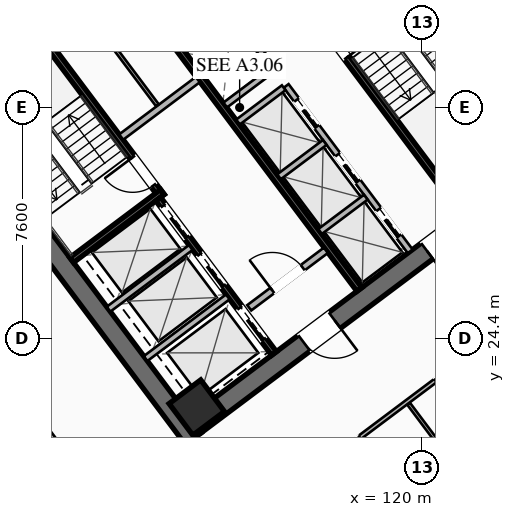
"""IFC4 building model, lengths in metres.
Left out: names, types, materials, properties, quantities, classifications, styles, units other than length and angle.
Written with IfcOpenShell. Run it as: python <this file> out.ifc"""

import sys

from ifc_helpers import new_model, si_unit, direction, frame, frame_2d, origin, origin_2d, place, context, subcontext, project, spatial, rectangle, hollow_rectangle, extrude, element, fill, save


model = new_model("IFC4")
c1 = context("Model", 3, precision=1e-05, world=origin(), true_north=direction((0.0, 1.0)))
c2 = subcontext(c1, "Body", "Model", "MODEL_VIEW")
j1 = project(units=[si_unit("LENGTHUNIT", "METRE"), si_unit("PLANEANGLEUNIT", "RADIAN")], contexts=[c1])
p1 = place(None, origin())
s1 = spatial("IfcSite", under=j1, at=p1, CompositionType="ELEMENT")
p2 = place(p1, origin())
s2 = spatial("IfcBuilding", under=s1, at=p2, CompositionType="ELEMENT")
p3 = place(p2, frame((0.0, 0.0, 38.8)))
s3 = spatial("IfcBuildingStorey", under=s2, at=p3, CompositionType="ELEMENT", Elevation=38.8)
for number, where, z_axis, x_axis in (
    (1, (112.476, 21.107, 0.0), (0.0, 0.0, 1.0), (-0.6, 0.8, 0.0)),
    (2, (115.524, 42.893, 0.0), (0.0, 0.0, 1.0), (0.6, -0.8, 0.0)),
):
    element("IfcWall", number, at=place(p3, frame(where, z_axis=z_axis, x_axis=x_axis)), inside=s3, PredefinedType="SHEAR", context=c2, shape_type="SweptSolid", body=[
        extrude(rectangle(XDim=15.6, YDim=0.65, at=frame_2d((7.8, 0.0))), origin(), (0.0, 0.0, 1.0), 3.55),
    ])
p4 = place(p3, frame((124.429, 30.478, 0.0), z_axis=(0.0, 0.0, 1.0), x_axis=(-0.799998028465, -0.600002628705, 0.0)))
e3 = element("IfcWall", 3, at=p4, inside=s3, PredefinedType="SHEAR", context=c2, shape_type="SweptSolid", body=[
    extrude(rectangle(XDim=14.86, YDim=0.65, at=frame_2d((7.43, 0.0))), origin(), (0.0, 0.0, 1.0), 3.55),
])
p5 = place(p4, frame((9.13, 0.0, 0.0)))
e4 = element("IfcOpeningElement", 4, at=p5, cuts=e3, PredefinedType="OPENING", context=c2, shape_type="SweptSolid", body=[
    extrude(rectangle(XDim=1.25, YDim=2.25, at=frame_2d((0.625, 1.125))), frame((0.0, 0.335, 0.0), z_axis=(0.0, -1.0, 0.0), x_axis=(1.0, 0.0, 0.0)), (0.0, 0.0, 1.0), 0.67),
])
p6 = place(p4, frame((4.08, 0.0, 0.0)))
e5 = element("IfcOpeningElement", 5, at=p6, cuts=e3, PredefinedType="OPENING", context=c2, shape_type="SweptSolid", body=[
    extrude(rectangle(XDim=1.25, YDim=2.25, at=frame_2d((0.625, 1.125))), frame((0.0, 0.335, 0.0), z_axis=(0.0, -1.0, 0.0), x_axis=(1.0, 0.0, 0.0)), (0.0, 0.0, 1.0), 0.67),
])
p7 = place(p3, frame((103.571, 33.522, 0.0), z_axis=(0.0, 0.0, 1.0), x_axis=(0.799998028465, 0.600002628705, 0.0)))
e6 = element("IfcWall", 6, at=p7, inside=s3, PredefinedType="SHEAR", context=c2, shape_type="SweptSolid", body=[
    extrude(rectangle(XDim=14.86, YDim=0.65, at=frame_2d((7.43, 0.0))), origin(), (0.0, 0.0, 1.0), 3.55),
])
p8 = place(p7, frame((4.48, 0.0, 0.0)))
e7 = element("IfcOpeningElement", 7, at=p8, cuts=e6, PredefinedType="OPENING", context=c2, shape_type="SweptSolid", body=[
    extrude(rectangle(XDim=1.25, YDim=2.25, at=frame_2d((0.625, 1.125))), frame((0.0, 0.335, 0.0), z_axis=(0.0, -1.0, 0.0), x_axis=(1.0, 0.0, 0.0)), (0.0, 0.0, 1.0), 0.67),
])
p9 = place(p7, frame((9.53, 0.0, 0.0)))
e8 = element("IfcOpeningElement", 8, at=p9, cuts=e6, PredefinedType="OPENING", context=c2, shape_type="SweptSolid", body=[
    extrude(rectangle(XDim=1.25, YDim=2.25, at=frame_2d((0.625, 1.125))), frame((0.0, 0.335, 0.0), z_axis=(0.0, -1.0, 0.0), x_axis=(1.0, 0.0, 0.0)), (0.0, 0.0, 1.0), 0.67),
])
p10 = place(p3, frame((112.59, 22.13, 0.0), z_axis=(0.0, 0.0, 1.0), x_axis=(0.799999996291, 0.600000004945, 0.0)))
e9 = element("IfcColumn", 9, at=p10, inside=s3, PredefinedType="COLUMN", context=c2, shape_type="SweptSolid", body=[
    extrude(hollow_rectangle(XDim=1.3, YDim=1.3, WallThickness=0.05, at=origin_2d()), origin(), (0.0, 0.0, 1.0), 3.35),
])
p11 = place(p3, frame((111.44, 29.08, 0.0), z_axis=(0.0, 0.0, 1.0), x_axis=(-0.600009827119, 0.799992629566, 0.0)))
e10 = element("IfcWall", 10, at=p11, inside=s3, PredefinedType="SHEAR", context=c2, shape_type="SweptSolid", body=[
    extrude(rectangle(XDim=7.95, YDim=0.2, at=frame_2d((3.975, 0.0))), origin(), (0.0, 0.0, 1.0), 3.35),
])
p12 = place(p11, frame((0.45, 0.0, 0.0)))
e11 = element("IfcOpeningElement", 11, at=p12, cuts=e10, PredefinedType="OPENING", context=c2, shape_type="SweptSolid", body=[
    extrude(rectangle(XDim=1.15, YDim=2.2, at=frame_2d((0.575, 1.1))), frame((0.0, 0.11, 0.0), z_axis=(0.0, -1.0, 0.0), x_axis=(1.0, 0.0, 0.0)), (0.0, 0.0, 1.0), 0.22),
])
p13 = place(p3, frame((108.476, 26.982, 0.0), z_axis=(0.0, 0.0, 1.0), x_axis=(0.799984290658, 0.600020945218, 0.0)))
e12 = element("IfcWall", 12, at=p13, inside=s3, PredefinedType="SHEAR", context=c2, shape_type="SweptSolid", body=[
    extrude(rectangle(XDim=3.73, YDim=0.2, at=frame_2d((1.865, 0.0))), origin(), (0.0, 0.0, 1.0), 3.35),
])
p14 = place(p3, frame((116.56, 34.92, 0.0), z_axis=(0.0, 0.0, 1.0), x_axis=(0.600009827119, -0.799992629566, 0.0)))
e13 = element("IfcWall", 13, at=p14, inside=s3, PredefinedType="SHEAR", context=c2, shape_type="SweptSolid", body=[
    extrude(rectangle(XDim=7.95, YDim=0.2, at=frame_2d((3.975, 0.0))), origin(), (0.0, 0.0, 1.0), 3.35),
])
p15 = place(p14, frame((0.45, 0.0, 0.0)))
e14 = element("IfcOpeningElement", 14, at=p15, cuts=e13, PredefinedType="OPENING", context=c2, shape_type="SweptSolid", body=[
    extrude(rectangle(XDim=1.15, YDim=2.2, at=frame_2d((0.575, 1.1))), frame((0.0, 0.11, 0.0), z_axis=(0.0, -1.0, 0.0), x_axis=(1.0, 0.0, 0.0)), (0.0, 0.0, 1.0), 0.22),
])
p16 = place(p3, frame((117.938, 26.016, 0.0), z_axis=(0.0, 0.0, 1.0), x_axis=(-0.600005463273, 0.799995902516, 0.0)))
e15 = element("IfcWall", 15, at=p16, inside=s3, PredefinedType="SHEAR", context=c2, shape_type="SweptSolid", body=[
    extrude(rectangle(XDim=14.3, YDim=0.2, at=frame_2d((7.15, 0.0))), origin(), (0.0, 0.0, 1.0), 3.35),
])
p17 = place(p3, frame((110.104, 31.028, 0.0), z_axis=(0.0, 0.0, 1.0), x_axis=(0.800018601094, 0.59997519774, 0.0)))
e16 = element("IfcWall", 16, at=p17, inside=s3, PredefinedType="SOLIDWALL", context=c2, shape_type="SweptSolid", body=[
    extrude(rectangle(XDim=3.15, YDim=0.22, at=frame_2d((1.575, 0.0))), origin(), (0.0, 0.0, 1.0), 2.703),
])
p18 = place(p3, frame((114.316, 25.412, 0.0), z_axis=(0.0, 0.0, 1.0), x_axis=(0.800018601094, 0.59997519774, 0.0)))
e17 = element("IfcWall", 17, at=p18, inside=s3, PredefinedType="SOLIDWALL", context=c2, shape_type="SweptSolid", body=[
    extrude(rectangle(XDim=3.15, YDim=0.22, at=frame_2d((1.575, 0.0))), origin(), (0.0, 0.0, 1.0), 2.703),
])
p19 = place(p18, frame((0.95, 0.0, 0.0)))
e18 = element("IfcOpeningElement", 18, at=p19, cuts=e17, PredefinedType="OPENING", context=c2, shape_type="SweptSolid", body=[
    extrude(rectangle(XDim=1.25, YDim=2.25, at=frame_2d((0.625, 1.125))), frame((0.0, 0.12, 0.0), z_axis=(0.0, -1.0, 0.0), x_axis=(1.0, 0.0, 0.0)), (0.0, 0.0, 1.0), 0.24),
])
p20 = place(p3, frame((115.13, 23.91, 0.0), z_axis=(0.0, 0.0, 1.0), x_axis=(-0.599975393228, 0.800018454488, 0.0)))
e19 = element("IfcWall", 19, at=p20, inside=s3, PredefinedType="SHEAR", context=c2, shape_type="SweptSolid", body=[
    extrude(rectangle(XDim=6.35, YDim=0.2, at=frame_2d((3.175, 0.0))), origin(), (0.0, 0.0, 1.0), 3.35),
])
p21 = place(p20, frame((4.775, 0.0, 0.0)))
e20 = element("IfcOpeningElement", 20, at=p21, cuts=e19, PredefinedType="OPENING", context=c2, shape_type="SweptSolid", body=[
    extrude(rectangle(XDim=1.3, YDim=2.25, at=frame_2d((0.65, 1.125))), frame((0.0, 0.11, 0.0), z_axis=(0.0, -1.0, 0.0), x_axis=(1.0, 0.0, 0.0)), (0.0, 0.0, 1.0), 0.22),
])
p22 = place(p20, frame((2.775, 0.0, 0.0)))
e21 = element("IfcOpeningElement", 21, at=p22, cuts=e19, PredefinedType="OPENING", context=c2, shape_type="SweptSolid", body=[
    extrude(rectangle(XDim=1.3, YDim=2.25, at=frame_2d((0.65, 1.125))), frame((0.0, 0.11, 0.0), z_axis=(0.0, -1.0, 0.0), x_axis=(1.0, 0.0, 0.0)), (0.0, 0.0, 1.0), 0.22),
])
p23 = place(p20, frame((0.575, 0.0, 0.0)))
e22 = element("IfcOpeningElement", 22, at=p23, cuts=e19, PredefinedType="OPENING", context=c2, shape_type="SweptSolid", body=[
    extrude(rectangle(XDim=1.3, YDim=2.25, at=frame_2d((0.65, 1.125))), frame((0.0, 0.11, 0.0), z_axis=(0.0, -1.0, 0.0), x_axis=(1.0, 0.0, 0.0)), (0.0, 0.0, 1.0), 0.22),
])
for number, where, z_axis, x_axis in (
    (23, (110.906, 23.742, 0.0), (0.0, 0.0, 1.0), (0.8, 0.6, 0.0)),
    (24, (109.688, 25.366, 0.0), (0.0, 0.0, 1.0), (0.8, 0.6, 0.0)),
):
    element("IfcWall", number, at=place(p3, frame(where, z_axis=z_axis, x_axis=x_axis)), inside=s3, PredefinedType="SOLIDWALL", context=c2, shape_type="SweptSolid", body=[
        extrude(rectangle(XDim=3.38, YDim=0.2, at=frame_2d((1.69, 0.0))), origin(), (0.0, 0.0, 1.0), 3.35),
    ])
p24 = place(p3, frame((111.296, 32.072, 0.0), z_axis=(0.0, 0.0, 1.0), x_axis=(-0.59995887973, 0.800030838552, 0.0)))
e25 = element("IfcWall", 25, at=p24, inside=s3, PredefinedType="PARTITIONING", context=c2, shape_type="SweptSolid", body=[
    extrude(rectangle(XDim=3.8, YDim=0.11, at=frame_2d((1.9, 0.0))), origin(), (0.0, 0.0, 1.0), 2.703),
])
p25 = place(p3, frame((119.61, 27.27, 0.0), z_axis=(0.0, 0.0, 1.0), x_axis=(-0.600011488909, 0.79999138319, 0.0)))
e26 = element("IfcWall", 26, at=p25, inside=s3, PredefinedType="SOLIDWALL", context=c2, shape_type="SweptSolid", body=[
    extrude(rectangle(XDim=6.8, YDim=0.2, at=frame_2d((3.4, 0.0))), origin(), (0.0, 0.0, 1.0), 3.35),
])
p26 = place(p25, frame((0.625, 0.0, 0.0)))
e27 = element("IfcOpeningElement", 27, at=p26, cuts=e26, PredefinedType="OPENING", context=c2, shape_type="SweptSolid", body=[
    extrude(rectangle(XDim=1.1, YDim=2.2, at=frame_2d((0.55, 1.1))), frame((0.0, 0.11, 0.0), z_axis=(0.0, -1.0, 0.0), x_axis=(1.0, 0.0, 0.0)), (0.0, 0.0, 1.0), 0.22),
])
p27 = place(p25, frame((2.875, 0.0, 0.0)))
e28 = element("IfcOpeningElement", 28, at=p27, cuts=e26, PredefinedType="OPENING", context=c2, shape_type="SweptSolid", body=[
    extrude(rectangle(XDim=1.1, YDim=2.2, at=frame_2d((0.55, 1.1))), frame((0.0, 0.11, 0.0), z_axis=(0.0, -1.0, 0.0), x_axis=(1.0, 0.0, 0.0)), (0.0, 0.0, 1.0), 0.22),
])
p28 = place(p25, frame((5.125, 0.0, 0.0)))
e29 = element("IfcOpeningElement", 29, at=p28, cuts=e26, PredefinedType="OPENING", context=c2, shape_type="SweptSolid", body=[
    extrude(rectangle(XDim=1.1, YDim=2.2, at=frame_2d((0.55, 1.1))), frame((0.0, 0.11, 0.0), z_axis=(0.0, -1.0, 0.0), x_axis=(1.0, 0.0, 0.0)), (0.0, 0.0, 1.0), 0.22),
])
p29 = place(p3, frame((116.646, 27.922, 0.0), z_axis=(0.0, 0.0, 1.0), x_axis=(0.8, 0.6, 0.0)))
e30 = element("IfcWall", 30, at=p29, inside=s3, PredefinedType="SOLIDWALL", context=c2, shape_type="SweptSolid", body=[
    extrude(rectangle(XDim=1.88, YDim=0.2, at=frame_2d((0.94, 0.0))), origin(), (0.0, 0.0, 1.0), 3.35),
])
p30 = place(p3, frame((115.296, 29.722, 0.0), z_axis=(0.0, 0.0, 1.0), x_axis=(0.799984418148, 0.600020775241, 0.0)))
e31 = element("IfcWall", 31, at=p30, inside=s3, PredefinedType="SOLIDWALL", context=c2, shape_type="SweptSolid", body=[
    extrude(rectangle(XDim=1.88, YDim=0.2, at=frame_2d((0.94, 0.0))), origin(), (0.0, 0.0, 1.0), 3.35),
])
p31 = place(p3, frame((113.946, 31.522, 0.0), z_axis=(0.0, 0.0, 1.0), x_axis=(0.8, 0.6, 0.0)))
e32 = element("IfcWall", 32, at=p31, inside=s3, PredefinedType="SOLIDWALL", context=c2, shape_type="SweptSolid", body=[
    extrude(rectangle(XDim=1.88, YDim=0.2, at=frame_2d((0.94, 0.0))), origin(), (0.0, 0.0, 1.0), 3.35),
])
p32 = place(p3, frame((115.11, 33.27, 0.0), z_axis=(0.0, 0.0, 1.0), x_axis=(-0.600011488909, 0.79999138319, 0.0)))
e33 = element("IfcWall", 33, at=p32, inside=s3, PredefinedType="SOLIDWALL", context=c2, shape_type="SweptSolid", body=[
    extrude(rectangle(XDim=6.8, YDim=0.2, at=frame_2d((3.4, 0.0))), origin(), (0.0, 0.0, 1.0), 3.35),
])
p33 = place(p3, frame((113.526, 32.082, 0.0), z_axis=(0.0, 0.0, 1.0), x_axis=(0.800046745961, 0.599937666993, 0.0)))
e34 = element("IfcWall", 34, at=p33, inside=s3, PredefinedType="SOLIDWALL", context=c2, shape_type="SweptSolid", body=[
    extrude(rectangle(XDim=1.88, YDim=0.2, at=frame_2d((0.94, 0.0))), origin(), (0.0, 0.0, 1.0), 3.35),
])
p34 = place(p3, frame((112.176, 33.882, 0.0), z_axis=(0.0, 0.0, 1.0), x_axis=(0.8, 0.6, 0.0)))
e35 = element("IfcWall", 35, at=p34, inside=s3, PredefinedType="SOLIDWALL", context=c2, shape_type="SweptSolid", body=[
    extrude(rectangle(XDim=1.88, YDim=0.2, at=frame_2d((0.94, 0.0))), origin(), (0.0, 0.0, 1.0), 3.35),
])
p35 = place(p3, frame((98.316, 33.862, 0.0), z_axis=(0.0, 0.0, 1.0), x_axis=(0.800001947934, 0.599997402746, 0.0)))
e36 = element("IfcWall", 36, at=p35, inside=s3, PredefinedType="PARTITIONING", context=c2, shape_type="SweptSolid", body=[
    extrude(rectangle(XDim=30.08, YDim=0.135, at=frame_2d((15.04, 0.0))), origin(), (0.0, 0.0, 1.0), 2.703),
])
p36 = place(p35, frame((0.3, 0.0, 0.0)))
e37 = element("IfcOpeningElement", 37, at=p36, cuts=e36, PredefinedType="OPENING", context=c2, shape_type="SweptSolid", body=[
    extrude(rectangle(XDim=0.95, YDim=2.05, at=frame_2d((0.475, 1.025))), frame((0.0, 0.077, 0.0), z_axis=(0.0, -1.0, 0.0), x_axis=(1.0, 0.0, 0.0)), (0.0, 0.0, 1.0), 0.155),
])
p37 = place(p35, frame((7.172, 0.0, 0.0)))
e38 = element("IfcOpeningElement", 38, at=p37, cuts=e36, PredefinedType="OPENING", context=c2, shape_type="SweptSolid", body=[
    extrude(rectangle(XDim=0.95, YDim=2.05, at=frame_2d((0.475, 1.025))), frame((0.0, 0.077, 0.0), z_axis=(0.0, -1.0, 0.0), x_axis=(1.0, 0.0, 0.0)), (0.0, 0.0, 1.0), 0.155),
])
p38 = place(p35, frame((11.218, 0.0, 0.0)))
e39 = element("IfcOpeningElement", 39, at=p38, cuts=e36, PredefinedType="OPENING", context=c2, shape_type="SweptSolid", body=[
    extrude(rectangle(XDim=0.95, YDim=2.05, at=frame_2d((0.475, 1.025))), frame((0.0, 0.077, 0.0), z_axis=(0.0, -1.0, 0.0), x_axis=(1.0, 0.0, 0.0)), (0.0, 0.0, 1.0), 0.155),
])
p39 = place(p35, frame((28.83, 0.0, 0.0)))
e40 = element("IfcOpeningElement", 40, at=p39, cuts=e36, PredefinedType="OPENING", context=c2, shape_type="SweptSolid", body=[
    extrude(rectangle(XDim=0.95, YDim=2.05, at=frame_2d((0.475, 1.025))), frame((0.0, 0.077, 0.0), z_axis=(0.0, -1.0, 0.0), x_axis=(1.0, 0.0, 0.0)), (0.0, 0.0, 1.0), 0.155),
])
p40 = place(p3, frame((135.55, 34.35, 0.0), z_axis=(0.0, 0.0, 1.0), x_axis=(-0.799998052067, -0.600002597235, 0.0)))
e41 = element("IfcWall", 41, at=p40, inside=s3, PredefinedType="PARTITIONING", context=c2, shape_type="SweptSolid", body=[
    extrude(rectangle(XDim=30.08, YDim=0.135, at=frame_2d((15.04, 0.0))), origin(), (0.0, 0.0, 1.0), 2.703),
])
p41 = place(p40, frame((28.75, 0.0, 0.0)))
e42 = element("IfcOpeningElement", 42, at=p41, cuts=e41, PredefinedType="OPENING", context=c2, shape_type="SweptSolid", body=[
    extrude(rectangle(XDim=0.95, YDim=2.05, at=frame_2d((0.475, 1.025))), frame((0.0, 0.077, 0.0), z_axis=(0.0, -1.0, 0.0), x_axis=(1.0, 0.0, 0.0)), (0.0, 0.0, 1.0), 0.155),
])
p42 = place(p40, frame((21.999, 0.0, 0.0)))
e43 = element("IfcOpeningElement", 43, at=p42, cuts=e41, PredefinedType="OPENING", context=c2, shape_type="SweptSolid", body=[
    extrude(rectangle(XDim=0.95, YDim=2.05, at=frame_2d((0.475, 1.025))), frame((0.0, 0.077, 0.0), z_axis=(0.0, -1.0, 0.0), x_axis=(1.0, 0.0, 0.0)), (0.0, 0.0, 1.0), 0.155),
])
p43 = place(p40, frame((17.939, 0.0, 0.0)))
e44 = element("IfcOpeningElement", 44, at=p43, cuts=e41, PredefinedType="OPENING", context=c2, shape_type="SweptSolid", body=[
    extrude(rectangle(XDim=0.95, YDim=2.05, at=frame_2d((0.475, 1.025))), frame((0.0, 0.077, 0.0), z_axis=(0.0, -1.0, 0.0), x_axis=(1.0, 0.0, 0.0)), (0.0, 0.0, 1.0), 0.155),
])
p44 = place(p40, frame((0.38, 0.0, 0.0)))
e45 = element("IfcOpeningElement", 45, at=p44, cuts=e41, PredefinedType="OPENING", context=c2, shape_type="SweptSolid", body=[
    extrude(rectangle(XDim=0.95, YDim=2.05, at=frame_2d((0.475, 1.025))), frame((0.0, 0.077, 0.0), z_axis=(0.0, -1.0, 0.0), x_axis=(1.0, 0.0, 0.0)), (0.0, 0.0, 1.0), 0.155),
])
p45 = place(p3, frame((125.888, 13.816, 0.0), z_axis=(0.0, 0.0, 1.0), x_axis=(-0.599981486892, 0.800013884496, 0.0)))
e46 = element("IfcWall", 46, at=p45, inside=s3, PredefinedType="PARTITIONING", context=c2, shape_type="SweptSolid", body=[
    extrude(rectangle(XDim=10.55, YDim=0.11, at=frame_2d((5.275, 0.0))), origin(), (0.0, 0.0, 1.0), 2.703),
])
p46 = place(p3, frame((111.438, 16.366, 0.0), z_axis=(0.0, 0.0, 1.0), x_axis=(-0.599996414648, 0.800002689001, 0.0)))
e47 = element("IfcWall", 47, at=p46, inside=s3, PredefinedType="PARTITIONING", context=c2, shape_type="SweptSolid", body=[
    extrude(rectangle(XDim=21.79, YDim=0.135, at=frame_2d((10.895, 0.0))), origin(), (0.0, 0.0, 1.0), 2.703),
])
p47 = place(p46, frame((0.3, 0.0, 0.0)))
e48 = element("IfcOpeningElement", 48, at=p47, cuts=e47, PredefinedType="OPENING", context=c2, shape_type="SweptSolid", body=[
    extrude(rectangle(XDim=0.95, YDim=2.05, at=frame_2d((0.475, 1.025))), frame((0.0, 0.077, 0.0), z_axis=(0.0, -1.0, 0.0), x_axis=(1.0, 0.0, 0.0)), (0.0, 0.0, 1.0), 0.155),
])
p48 = place(p5, origin())
e49 = element("IfcDoor", 49, at=p48, inside=s3, OperationType="SINGLE_SWING_LEFT", PredefinedType="DOOR", context=c2, shape_type="SweptSolid", body=[
    extrude(rectangle(XDim=1.25, YDim=2.25, at=frame_2d((0.625, 1.125))), frame((0.0, 0.025, 0.0), z_axis=(0.0, -1.0, 0.0), x_axis=(1.0, 0.0, 0.0)), (0.0, 0.0, 1.0), 0.05),
])
fill(e4, e49)
p49 = place(p6, origin())
e50 = element("IfcDoor", 50, at=p49, inside=s3, OperationType="SINGLE_SWING_RIGHT", PredefinedType="DOOR", context=c2, shape_type="SweptSolid", body=[
    extrude(rectangle(XDim=1.25, YDim=2.25, at=frame_2d((0.625, 1.125))), frame((0.0, 0.025, 0.0), z_axis=(0.0, -1.0, 0.0), x_axis=(1.0, 0.0, 0.0)), (0.0, 0.0, 1.0), 0.05),
])
fill(e5, e50)
p50 = place(p12, origin())
e51 = element("IfcDoor", 51, at=p50, inside=s3, OperationType="SINGLE_SWING_RIGHT", PredefinedType="DOOR", context=c2, shape_type="SweptSolid", body=[
    extrude(rectangle(XDim=1.15, YDim=2.2, at=frame_2d((0.575, 1.1))), frame((0.0, 0.025, 0.0), z_axis=(0.0, -1.0, 0.0), x_axis=(1.0, 0.0, 0.0)), (0.0, 0.0, 1.0), 0.05),
])
fill(e11, e51)
p51 = place(p15, origin())
e52 = element("IfcDoor", 52, at=p51, inside=s3, OperationType="SINGLE_SWING_RIGHT", PredefinedType="DOOR", context=c2, shape_type="SweptSolid", body=[
    extrude(rectangle(XDim=1.15, YDim=2.2, at=frame_2d((0.575, 1.1))), frame((0.0, 0.025, 0.0), z_axis=(0.0, -1.0, 0.0), x_axis=(1.0, 0.0, 0.0)), (0.0, 0.0, 1.0), 0.05),
])
fill(e14, e52)
p52 = place(p19, origin())
e53 = element("IfcDoor", 53, at=p52, inside=s3, OperationType="SINGLE_SWING_LEFT", PredefinedType="DOOR", context=c2, shape_type="SweptSolid", body=[
    extrude(rectangle(XDim=1.25, YDim=2.25, at=frame_2d((0.625, 1.125))), frame((0.0, 0.025, 0.0), z_axis=(0.0, -1.0, 0.0), x_axis=(1.0, 0.0, 0.0)), (0.0, 0.0, 1.0), 0.05),
])
fill(e18, e53)
p53 = place(p42, origin())
e54 = element("IfcDoor", 54, at=p53, inside=s3, OperationType="SINGLE_SWING_RIGHT", PredefinedType="DOOR", context=c2, shape_type="SweptSolid", body=[
    extrude(rectangle(XDim=0.95, YDim=2.05, at=frame_2d((0.475, 1.025))), frame((0.0, 0.025, 0.0), z_axis=(0.0, -1.0, 0.0), x_axis=(1.0, 0.0, 0.0)), (0.0, 0.0, 1.0), 0.05),
])
fill(e43, e54)
p54 = place(p43, origin())
e55 = element("IfcDoor", 55, at=p54, inside=s3, OperationType="SINGLE_SWING_LEFT", PredefinedType="DOOR", context=c2, shape_type="SweptSolid", body=[
    extrude(rectangle(XDim=0.95, YDim=2.05, at=frame_2d((0.475, 1.025))), frame((0.0, 0.025, 0.0), z_axis=(0.0, -1.0, 0.0), x_axis=(1.0, 0.0, 0.0)), (0.0, 0.0, 1.0), 0.05),
])
fill(e44, e55)
p55 = place(p21, origin())
e56 = element("IfcDoor", 56, at=p55, inside=s3, OperationType="SLIDING_TO_LEFT", PredefinedType="DOOR", context=c2, shape_type="SweptSolid", body=[
    extrude(rectangle(XDim=1.3, YDim=2.25, at=frame_2d((0.65, 1.125))), frame((0.0, 0.025, 0.0), z_axis=(0.0, -1.0, 0.0), x_axis=(1.0, 0.0, 0.0)), (0.0, 0.0, 1.0), 0.05),
])
fill(e20, e56)
p56 = place(p22, origin())
e57 = element("IfcDoor", 57, at=p56, inside=s3, OperationType="SLIDING_TO_LEFT", PredefinedType="DOOR", context=c2, shape_type="SweptSolid", body=[
    extrude(rectangle(XDim=1.3, YDim=2.25, at=frame_2d((0.65, 1.125))), frame((0.0, 0.025, 0.0), z_axis=(0.0, -1.0, 0.0), x_axis=(1.0, 0.0, 0.0)), (0.0, 0.0, 1.0), 0.05),
])
fill(e21, e57)
p57 = place(p23, origin())
e58 = element("IfcDoor", 58, at=p57, inside=s3, OperationType="SLIDING_TO_LEFT", PredefinedType="DOOR", context=c2, shape_type="SweptSolid", body=[
    extrude(rectangle(XDim=1.3, YDim=2.25, at=frame_2d((0.65, 1.125))), frame((0.0, 0.025, 0.0), z_axis=(0.0, -1.0, 0.0), x_axis=(1.0, 0.0, 0.0)), (0.0, 0.0, 1.0), 0.05),
])
fill(e22, e58)
p58 = place(p26, origin())
e59 = element("IfcDoor", 59, at=p58, inside=s3, OperationType="SLIDING_TO_LEFT", PredefinedType="DOOR", context=c2, shape_type="SweptSolid", body=[
    extrude(rectangle(XDim=1.1, YDim=2.2, at=frame_2d((0.55, 1.1))), frame((0.0, 0.025, 0.0), z_axis=(0.0, -1.0, 0.0), x_axis=(1.0, 0.0, 0.0)), (0.0, 0.0, 1.0), 0.05),
])
fill(e27, e59)
p59 = place(p27, origin())
e60 = element("IfcDoor", 60, at=p59, inside=s3, OperationType="SLIDING_TO_LEFT", PredefinedType="DOOR", context=c2, shape_type="SweptSolid", body=[
    extrude(rectangle(XDim=1.1, YDim=2.2, at=frame_2d((0.55, 1.1))), frame((0.0, 0.025, 0.0), z_axis=(0.0, -1.0, 0.0), x_axis=(1.0, 0.0, 0.0)), (0.0, 0.0, 1.0), 0.05),
])
fill(e28, e60)
p60 = place(p28, origin())
e61 = element("IfcDoor", 61, at=p60, inside=s3, OperationType="SLIDING_TO_LEFT", PredefinedType="DOOR", context=c2, shape_type="SweptSolid", body=[
    extrude(rectangle(XDim=1.1, YDim=2.2, at=frame_2d((0.55, 1.1))), frame((0.0, 0.025, 0.0), z_axis=(0.0, -1.0, 0.0), x_axis=(1.0, 0.0, 0.0)), (0.0, 0.0, 1.0), 0.05),
])
fill(e29, e61)
save(model, sys.argv[1])
